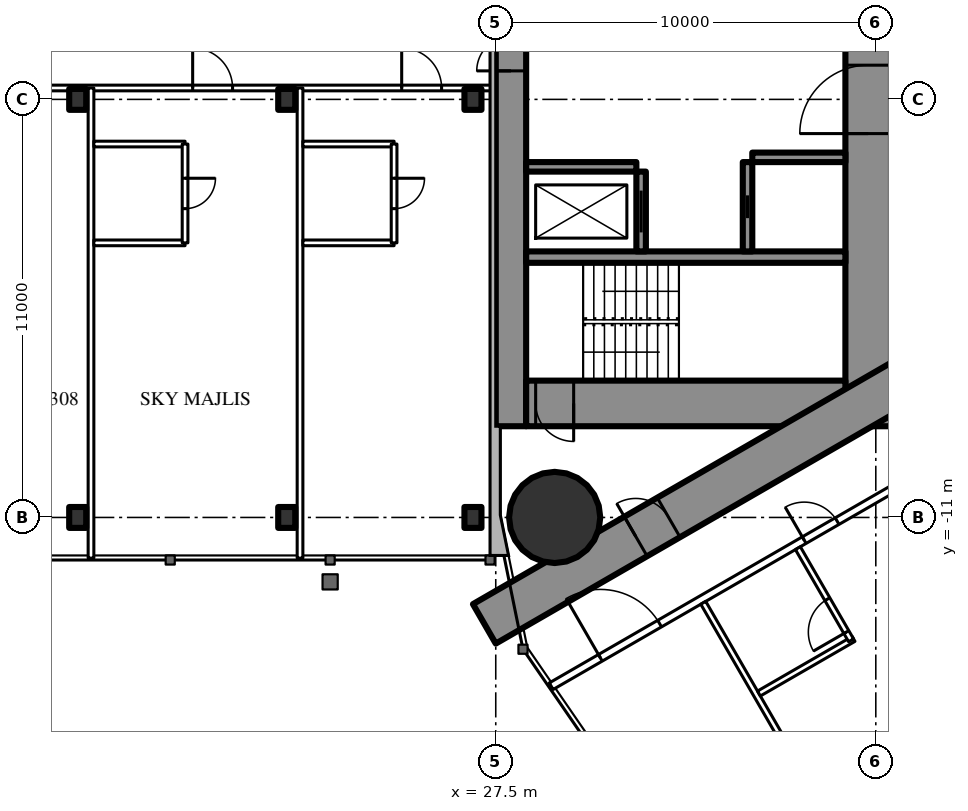
"""IFC4 building model, lengths in metres.
Left out: names, types, materials, properties, quantities, classifications, styles, units other than length and angle.
Written with IfcOpenShell. Run it as: python <this file> out.ifc"""

import sys

from ifc_helpers import new_model, si_unit, direction, frame, frame_2d, origin, origin_2d, place, context, subcontext, project, spatial, rectangle, circle, i_section, extrude, element, fill, save


model = new_model("IFC4")
c1 = context("Model", 3, precision=1e-05, world=origin(), true_north=direction((0.0, 1.0)))
c2 = subcontext(c1, "Body", "Model", "MODEL_VIEW")
j1 = project(units=[si_unit("LENGTHUNIT", "METRE"), si_unit("PLANEANGLEUNIT", "RADIAN")], contexts=[c1])
p1 = place(None, origin())
s1 = spatial("IfcSite", under=j1, at=p1, CompositionType="ELEMENT")
p2 = place(p1, origin())
s2 = spatial("IfcBuilding", under=s1, at=p2, CompositionType="ELEMENT")
p3 = place(p2, frame((0.0, 0.0, 236.9)))
s3 = spatial("IfcBuildingStorey", under=s2, at=p3, CompositionType="ELEMENT", Elevation=236.9)
p4 = place(p3, frame((29.05, -11.0, 0.0), z_axis=(0.0, 0.0, 1.0), x_axis=(1.0, 0.0, 0.0)))
e1 = element("IfcColumn", 1, at=p4, inside=s3, PredefinedType="COLUMN", context=c2, shape_type="SweptSolid", body=[
    extrude(circle(Radius=1.2, at=origin_2d()), origin(), (0.0, 0.0, 1.0), 3.6),
])
p5 = place(p3, frame((27.9, -8.6, 0.0), z_axis=(0.0, 0.0, 1.0), x_axis=(0.0, 1.0, 0.0)))
e2 = element("IfcWall", 2, at=p5, inside=s3, PredefinedType="SHEAR", context=c2, shape_type="SweptSolid", body=[
    extrude(rectangle(XDim=17.2, YDim=0.8, at=frame_2d((8.6, 0.0))), origin(), (0.0, 0.0, 1.0), 3.6),
])
p6 = place(p5, frame((9.35, 0.0, 0.0)))
e3 = element("IfcOpeningElement", 3, at=p6, cuts=e2, PredefinedType="OPENING", context=c2, shape_type="SweptSolid", body=[
    extrude(rectangle(XDim=0.9, YDim=2.2, at=frame_2d((0.45, 1.1))), frame((0.0, 0.41, 0.0), z_axis=(0.0, -1.0, 0.0), x_axis=(1.0, 0.0, 0.0)), (0.0, 0.0, 1.0), 0.82),
])
p7 = place(p3, frame((37.3, -8.6, 0.0), z_axis=(0.0, 0.0, 1.0), x_axis=(0.0, 1.0, 0.0)))
e4 = element("IfcWall", 4, at=p7, inside=s3, PredefinedType="SHEAR", context=c2, shape_type="SweptSolid", body=[
    extrude(rectangle(XDim=17.2, YDim=1.2, at=frame_2d((8.6, 0.0))), origin(), (0.0, 0.0, 1.0), 3.6),
])
p8 = place(p7, frame((7.7, 0.0, 0.0)))
e5 = element("IfcOpeningElement", 5, at=p8, cuts=e4, PredefinedType="OPENING", context=c2, shape_type="SweptSolid", body=[
    extrude(rectangle(XDim=1.8, YDim=2.2, at=frame_2d((0.9, 1.1))), frame((0.0, 0.61, 0.0), z_axis=(0.0, -1.0, 0.0), x_axis=(1.0, 0.0, 0.0)), (0.0, 0.0, 1.0), 1.22),
])
p9 = place(p3, frame((28.3, -8.0, 0.0), z_axis=(0.0, 0.0, 1.0), x_axis=(1.0, 0.0, 0.0)))
e6 = element("IfcWall", 6, at=p9, inside=s3, PredefinedType="SHEAR", context=c2, shape_type="SweptSolid", body=[
    extrude(rectangle(XDim=8.4, YDim=1.2, at=frame_2d((4.2, 0.0))), origin(), (0.0, 0.0, 1.0), 3.6),
])
p10 = place(p9, frame((0.25, 0.0, 0.0)))
e7 = element("IfcOpeningElement", 7, at=p10, cuts=e6, PredefinedType="OPENING", context=c2, shape_type="SweptSolid", body=[
    extrude(rectangle(XDim=1.0, YDim=2.2, at=frame_2d((0.5, 1.1))), frame((0.0, 0.61, 0.0), z_axis=(0.0, -1.0, 0.0), x_axis=(1.0, 0.0, 0.0)), (0.0, 0.0, 1.0), 1.22),
])
p11 = place(p3, frame((28.3, -4.15, 0.0), z_axis=(0.0, 0.0, 1.0), x_axis=(1.0, 0.0, 0.0)))
e8 = element("IfcWall", 8, at=p11, inside=s3, PredefinedType="SHEAR", context=c2, shape_type="SweptSolid", body=[
    extrude(rectangle(XDim=8.4, YDim=0.3, at=frame_2d((4.2, 0.0))), origin(), (0.0, 0.0, 1.0), 3.6),
])
p12 = place(p3, frame((31.325, -4.0, 0.0), z_axis=(0.0, 0.0, 1.0), x_axis=(0.0, 1.0, 0.0)))
e9 = element("IfcWall", 9, at=p12, inside=s3, PredefinedType="SHEAR", context=c2, shape_type="SweptSolid", body=[
    extrude(rectangle(XDim=2.1, YDim=0.25, at=frame_2d((1.05, 0.0))), origin(), (0.0, 0.0, 1.0), 3.6),
])
p13 = place(p12, frame((0.5, 0.0, 0.0)))
e10 = element("IfcOpeningElement", 10, at=p13, cuts=e9, PredefinedType="OPENING", context=c2, shape_type="SweptSolid", body=[
    extrude(rectangle(XDim=1.1, YDim=2.2, at=frame_2d((0.55, 1.1))), frame((0.0, 0.135, 0.0), z_axis=(0.0, -1.0, 0.0), x_axis=(1.0, 0.0, 0.0)), (0.0, 0.0, 1.0), 0.27),
])
p14 = place(p3, frame((34.125, -4.0, 0.0), z_axis=(0.0, 0.0, 1.0), x_axis=(0.0, 1.0, 0.0)))
e11 = element("IfcWall", 11, at=p14, inside=s3, PredefinedType="SHEAR", context=c2, shape_type="SweptSolid", body=[
    extrude(rectangle(XDim=2.35, YDim=0.25, at=frame_2d((1.175, 0.0))), origin(), (0.0, 0.0, 1.0), 3.6),
])
p15 = place(p14, frame((0.875, 0.0, 0.0)))
e12 = element("IfcOpeningElement", 12, at=p15, cuts=e11, PredefinedType="OPENING", context=c2, shape_type="SweptSolid", body=[
    extrude(rectangle(XDim=0.6, YDim=2.0, at=frame_2d((0.3, 1.0))), frame((0.0, 0.135, 0.0), z_axis=(0.0, -1.0, 0.0), x_axis=(1.0, 0.0, 0.0)), (0.0, 0.0, 1.0), 0.27),
])
p16 = place(p3, frame((28.3, -1.775, 0.0), z_axis=(0.0, 0.0, 1.0), x_axis=(1.0, 0.0, 0.0)))
e13 = element("IfcWall", 13, at=p16, inside=s3, PredefinedType="SHEAR", context=c2, shape_type="SweptSolid", body=[
    extrude(rectangle(XDim=2.9, YDim=0.25, at=frame_2d((1.45, 0.0))), origin(), (0.0, 0.0, 1.0), 3.6),
])
p17 = place(p3, frame((34.25, -1.525, 0.0), z_axis=(0.0, 0.0, 1.0), x_axis=(1.0, 0.0, 0.0)))
e14 = element("IfcWall", 14, at=p17, inside=s3, PredefinedType="SHEAR", context=c2, shape_type="SweptSolid", body=[
    extrude(rectangle(XDim=2.45, YDim=0.25, at=frame_2d((1.225, 0.0))), origin(), (0.0, 0.0, 1.0), 3.6),
])
p18 = place(p3, frame((27.2, -13.8, 0.0), z_axis=(0.0, 0.0, 1.0), x_axis=(0.866027159892, 0.499996958321, 0.0)))
e15 = element("IfcWall", 15, at=p18, inside=s3, PredefinedType="SHEAR", context=c2, shape_type="SweptSolid", body=[
    extrude(rectangle(XDim=27.947, YDim=1.2, at=frame_2d((13.973, 0.0))), origin(), (0.0, 0.0, 1.0), 3.6),
])
p19 = place(p18, frame((4.6, 0.0, 0.0)))
e16 = element("IfcOpeningElement", 16, at=p19, cuts=e15, PredefinedType="OPENING", context=c2, shape_type="SweptSolid", body=[
    extrude(rectangle(XDim=1.0, YDim=2.2, at=frame_2d((0.5, 1.1))), frame((0.0, 0.61, 0.0), z_axis=(0.0, -1.0, 0.0), x_axis=(1.0, 0.0, 0.0)), (0.0, 0.0, 1.0), 1.22),
])
p20 = place(p18, frame((13.395, 0.0, 0.0)))
e17 = element("IfcOpeningElement", 17, at=p20, cuts=e15, PredefinedType="OPENING", context=c2, shape_type="SweptSolid", body=[
    extrude(rectangle(XDim=1.8, YDim=2.2, at=frame_2d((0.9, 1.1))), frame((0.0, 0.61, 0.0), z_axis=(0.0, -1.0, 0.0), x_axis=(1.0, 0.0, 0.0)), (0.0, 0.0, 1.0), 1.22),
])
p21 = place(p3, frame((27.2, 13.8, 0.0), z_axis=(0.0, 0.0, 1.0), x_axis=(0.866024515034, -0.500001539357, 0.0)))
e18 = element("IfcWall", 18, at=p21, inside=s3, PredefinedType="SHEAR", context=c2, shape_type="SweptSolid", body=[
    extrude(rectangle(XDim=26.907, YDim=1.2, at=frame_2d((13.454, 0.0))), origin(), (0.0, 0.0, 1.0), 3.6),
])
p22 = place(p21, frame((4.6, 0.0, 0.0)))
e19 = element("IfcOpeningElement", 19, at=p22, cuts=e18, PredefinedType="OPENING", context=c2, shape_type="SweptSolid", body=[
    extrude(rectangle(XDim=1.0, YDim=2.2, at=frame_2d((0.5, 1.1))), frame((0.0, 0.61, 0.0), z_axis=(0.0, -1.0, 0.0), x_axis=(1.0, 0.0, 0.0)), (0.0, 0.0, 1.0), 1.22),
])
p23 = place(p21, frame((13.395, 0.0, 0.0)))
e20 = element("IfcOpeningElement", 20, at=p23, cuts=e18, PredefinedType="OPENING", context=c2, shape_type="SweptSolid", body=[
    extrude(rectangle(XDim=1.8, YDim=2.2, at=frame_2d((0.9, 1.1))), frame((0.0, 0.61, 0.0), z_axis=(0.0, -1.0, 0.0), x_axis=(1.0, 0.0, 0.0)), (0.0, 0.0, 1.0), 1.22),
])
for number, where, z_axis, x_axis in (
    (21, (16.5, -11.0, 0.0), (0.0, 0.0, 1.0), (1.0, 0.0, 0.0)),
    (22, (22.0, -11.0, 0.0), (0.0, 0.0, 1.0), (1.0, 0.0, 0.0)),
    (23, (26.9, -11.0, 0.0), (0.0, 0.0, 1.0), (1.0, 0.0, 0.0)),
    (24, (16.5, 0.0, 0.0), (0.0, 0.0, 1.0), (1.0, 0.0, 0.0)),
    (25, (22.0, 0.0, 0.0), (0.0, 0.0, 1.0), (1.0, 0.0, 0.0)),
    (26, (26.9, 0.0, 0.0), (0.0, 0.0, 1.0), (1.0, 0.0, 0.0)),
):
    element("IfcColumn", number, at=place(p3, frame(where, z_axis=z_axis, x_axis=x_axis)), inside=s3, PredefinedType="COLUMN", context=c2, shape_type="SweptSolid", body=[
        extrude(i_section(OverallWidth=0.448, OverallDepth=0.55, WebThickness=0.072, FlangeThickness=0.115, FilletRadius=0.02, at=origin_2d()), origin(), (0.0, 0.0, 1.0), 3.6),
    ])
p24 = place(p3, frame((28.959, -15.44, 0.0), z_axis=(0.0, 0.0, 1.0), x_axis=(0.866025227435, 0.500000305447, 0.0)))
e27 = element("IfcWall", 27, at=p24, inside=s3, PredefinedType="PARTITIONING", context=c2, shape_type="SweptSolid", body=[
    extrude(rectangle(XDim=30.88, YDim=0.2, at=frame_2d((15.44, 0.0))), origin(), (0.0, 0.0, 1.0), 3.35),
])
p25 = place(p24, frame((1.494, 0.0, 0.0)))
e28 = element("IfcOpeningElement", 28, at=p25, cuts=e27, PredefinedType="OPENING", context=c2, shape_type="SweptSolid", body=[
    extrude(rectangle(XDim=1.8, YDim=2.03, at=frame_2d((0.9, 1.015))), frame((0.0, 0.11, 0.0), z_axis=(0.0, -1.0, 0.0), x_axis=(1.0, 0.0, 0.0)), (0.0, 0.0, 1.0), 0.22),
])
p26 = place(p24, frame((7.687, 0.0, 0.0)))
e29 = element("IfcOpeningElement", 29, at=p26, cuts=e27, PredefinedType="OPENING", context=c2, shape_type="SweptSolid", body=[
    extrude(rectangle(XDim=1.0, YDim=2.2, at=frame_2d((0.5, 1.1))), frame((0.0, 0.11, 0.0), z_axis=(0.0, -1.0, 0.0), x_axis=(1.0, 0.0, 0.0)), (0.0, 0.0, 1.0), 0.22),
])
p27 = place(p24, frame((16.137, 0.0, 0.0)))
e30 = element("IfcOpeningElement", 30, at=p27, cuts=e27, PredefinedType="OPENING", context=c2, shape_type="SweptSolid", body=[
    extrude(rectangle(XDim=0.95, YDim=2.2, at=frame_2d((0.475, 1.1))), frame((0.0, 0.11, 0.0), z_axis=(0.0, -1.0, 0.0), x_axis=(1.0, 0.0, 0.0)), (0.0, 0.0, 1.0), 0.22),
])
p28 = place(p24, frame((20.021, 0.0, 0.0)))
e31 = element("IfcOpeningElement", 31, at=p28, cuts=e27, PredefinedType="OPENING", context=c2, shape_type="SweptSolid", body=[
    extrude(rectangle(XDim=0.95, YDim=2.2, at=frame_2d((0.475, 1.1))), frame((0.0, 0.11, 0.0), z_axis=(0.0, -1.0, 0.0), x_axis=(1.0, 0.0, 0.0)), (0.0, 0.0, 1.0), 0.22),
])
p29 = place(p24, frame((26.253, 0.0, 0.0)))
e32 = element("IfcOpeningElement", 32, at=p29, cuts=e27, PredefinedType="OPENING", context=c2, shape_type="SweptSolid", body=[
    extrude(rectangle(XDim=0.95, YDim=2.2, at=frame_2d((0.475, 1.1))), frame((0.0, 0.11, 0.0), z_axis=(0.0, -1.0, 0.0), x_axis=(1.0, 0.0, 0.0)), (0.0, 0.0, 1.0), 0.22),
])
p30 = place(p3, frame((32.96, -13.246, 0.0), z_axis=(0.0, 0.0, 1.0), x_axis=(0.500000236886, -0.866025267018, 0.0)))
e33 = element("IfcWall", 33, at=p30, inside=s3, PredefinedType="PARTITIONING", context=c2, shape_type="SweptSolid", body=[
    extrude(rectangle(XDim=7.583, YDim=0.15, at=frame_2d((3.791, 0.0))), origin(), (0.0, 0.0, 1.0), 3.35),
])
p31 = place(p3, frame((34.425, -15.633, 0.0), z_axis=(0.0, 0.0, 1.0), x_axis=(0.866018712932, 0.500011588718, 0.0)))
e34 = element("IfcWall", 34, at=p31, inside=s3, PredefinedType="PARTITIONING", context=c2, shape_type="SweptSolid", body=[
    extrude(rectangle(XDim=2.875, YDim=0.15, at=frame_2d((1.438, 0.0))), origin(), (0.0, 0.0, 1.0), 3.35),
])
p32 = place(p3, frame((35.45, -11.808, 0.0), z_axis=(0.0, 0.0, 1.0), x_axis=(0.49994636267, -0.866056369097, 0.0)))
e35 = element("IfcWall", 35, at=p32, inside=s3, PredefinedType="PARTITIONING", context=c2, shape_type="SweptSolid", body=[
    extrude(rectangle(XDim=2.8, YDim=0.15, at=frame_2d((1.4, 0.0))), origin(), (0.0, 0.0, 1.0), 3.35),
])
p33 = place(p32, frame((1.55, 0.0, 0.0)))
e36 = element("IfcOpeningElement", 36, at=p33, cuts=e35, PredefinedType="OPENING", context=c2, shape_type="SweptSolid", body=[
    extrude(rectangle(XDim=1.0, YDim=2.2, at=frame_2d((0.5, 1.1))), frame((0.0, 0.085, 0.0), z_axis=(0.0, -1.0, 0.0), x_axis=(1.0, 0.0, 0.0)), (0.0, 0.0, 1.0), 0.17),
])
p34 = place(p3, frame((-27.5, 0.3, 0.0), z_axis=(0.0, 0.0, 1.0), x_axis=(1.0, 0.0, 0.0)))
e37 = element("IfcWall", 37, at=p34, inside=s3, PredefinedType="PARTITIONING", context=c2, shape_type="SweptSolid", body=[
    extrude(rectangle(XDim=55.0, YDim=0.15, at=frame_2d((27.5, 0.0))), origin(), (0.0, 0.0, 1.0), 2.4),
])
p35 = place(p34, frame((1.575, 0.0, 0.0)))
e38 = element("IfcOpeningElement", 38, at=p35, cuts=e37, PredefinedType="OPENING", context=c2, shape_type="SweptSolid", body=[
    extrude(rectangle(XDim=1.0, YDim=2.2, at=frame_2d((0.5, 1.1))), frame((0.0, 0.085, 0.0), z_axis=(0.0, -1.0, 0.0), x_axis=(1.0, 0.0, 0.0)), (0.0, 0.0, 1.0), 0.17),
])
p36 = place(p34, frame((8.525, 0.0, 0.0)))
e39 = element("IfcOpeningElement", 39, at=p36, cuts=e37, PredefinedType="OPENING", context=c2, shape_type="SweptSolid", body=[
    extrude(rectangle(XDim=1.05, YDim=2.4, at=frame_2d((0.525, 1.2))), frame((0.0, 0.085, 0.0), z_axis=(0.0, -1.0, 0.0), x_axis=(1.0, 0.0, 0.0)), (0.0, 0.0, 1.0), 0.17),
])
p37 = place(p34, frame((14.025, 0.0, 0.0)))
e40 = element("IfcOpeningElement", 40, at=p37, cuts=e37, PredefinedType="OPENING", context=c2, shape_type="SweptSolid", body=[
    extrude(rectangle(XDim=1.05, YDim=2.4, at=frame_2d((0.525, 1.2))), frame((0.0, 0.085, 0.0), z_axis=(0.0, -1.0, 0.0), x_axis=(1.0, 0.0, 0.0)), (0.0, 0.0, 1.0), 0.17),
])
p38 = place(p34, frame((25.025, 0.0, 0.0)))
e41 = element("IfcOpeningElement", 41, at=p38, cuts=e37, PredefinedType="OPENING", context=c2, shape_type="SweptSolid", body=[
    extrude(rectangle(XDim=1.05, YDim=2.4, at=frame_2d((0.525, 1.2))), frame((0.0, 0.085, 0.0), z_axis=(0.0, -1.0, 0.0), x_axis=(1.0, 0.0, 0.0)), (0.0, 0.0, 1.0), 0.17),
])
p39 = place(p34, frame((30.525, 0.0, 0.0)))
e42 = element("IfcOpeningElement", 42, at=p39, cuts=e37, PredefinedType="OPENING", context=c2, shape_type="SweptSolid", body=[
    extrude(rectangle(XDim=1.05, YDim=2.4, at=frame_2d((0.525, 1.2))), frame((0.0, 0.085, 0.0), z_axis=(0.0, -1.0, 0.0), x_axis=(1.0, 0.0, 0.0)), (0.0, 0.0, 1.0), 0.17),
])
p40 = place(p34, frame((41.525, 0.0, 0.0)))
e43 = element("IfcOpeningElement", 43, at=p40, cuts=e37, PredefinedType="OPENING", context=c2, shape_type="SweptSolid", body=[
    extrude(rectangle(XDim=1.05, YDim=2.4, at=frame_2d((0.525, 1.2))), frame((0.0, 0.085, 0.0), z_axis=(0.0, -1.0, 0.0), x_axis=(1.0, 0.0, 0.0)), (0.0, 0.0, 1.0), 0.17),
])
p41 = place(p34, frame((47.025, 0.0, 0.0)))
e44 = element("IfcOpeningElement", 44, at=p41, cuts=e37, PredefinedType="OPENING", context=c2, shape_type="SweptSolid", body=[
    extrude(rectangle(XDim=1.05, YDim=2.4, at=frame_2d((0.525, 1.2))), frame((0.0, 0.085, 0.0), z_axis=(0.0, -1.0, 0.0), x_axis=(1.0, 0.0, 0.0)), (0.0, 0.0, 1.0), 0.17),
])
p42 = place(p34, frame((52.525, 0.0, 0.0)))
e45 = element("IfcOpeningElement", 45, at=p42, cuts=e37, PredefinedType="OPENING", context=c2, shape_type="SweptSolid", body=[
    extrude(rectangle(XDim=1.05, YDim=2.4, at=frame_2d((0.525, 1.2))), frame((0.0, 0.085, 0.0), z_axis=(0.0, -1.0, 0.0), x_axis=(1.0, 0.0, 0.0)), (0.0, 0.0, 1.0), 0.17),
])
for number, where, z_axis, x_axis in (
    (46, (16.85, -12.07, 0.0), (0.0, 0.0, 1.0), (0.0, 1.0, 0.0)),
    (47, (22.35, -12.07, 0.0), (0.0, 0.0, 1.0), (0.0, 1.0, 0.0)),
):
    element("IfcWall", number, at=place(p3, frame(where, z_axis=z_axis, x_axis=x_axis)), inside=s3, PredefinedType="PARTITIONING", context=c2, shape_type="SweptSolid", body=[
        extrude(rectangle(XDim=12.37, YDim=0.15, at=frame_2d((6.185, 0.0))), origin(), (0.0, 0.0, 1.0), 3.4),
    ])
for number, where, z_axis, x_axis in (
    (48, (16.925, -3.775, 0.0), (0.0, 0.0, 1.0), (1.0, 0.0, 0.0)),
    (49, (16.925, -1.175, 0.0), (0.0, 0.0, 1.0), (1.0, 0.0, 0.0)),
):
    element("IfcWall", number, at=place(p3, frame(where, z_axis=z_axis, x_axis=x_axis)), inside=s3, PredefinedType="PARTITIONING", context=c2, shape_type="SweptSolid", body=[
        extrude(rectangle(XDim=2.4, YDim=0.15, at=frame_2d((1.2, 0.0))), origin(), (0.0, 0.0, 1.0), 3.4),
    ])
p43 = place(p3, frame((19.325, -3.775, 0.0), z_axis=(0.0, 0.0, 1.0), x_axis=(0.0, 1.0, 0.0)))
e50 = element("IfcWall", 50, at=p43, inside=s3, PredefinedType="PARTITIONING", context=c2, shape_type="SweptSolid", body=[
    extrude(rectangle(XDim=2.6, YDim=0.15, at=frame_2d((1.3, 0.0))), origin(), (0.0, 0.0, 1.0), 3.4),
])
p44 = place(p43, frame((0.9, 0.0, 0.0)))
e51 = element("IfcOpeningElement", 51, at=p44, cuts=e50, PredefinedType="OPENING", context=c2, shape_type="SweptSolid", body=[
    extrude(rectangle(XDim=0.8, YDim=2.2, at=frame_2d((0.4, 1.1))), frame((0.0, 0.085, 0.0), z_axis=(0.0, -1.0, 0.0), x_axis=(1.0, 0.0, 0.0)), (0.0, 0.0, 1.0), 0.17),
])
for number, where, z_axis, x_axis in (
    (52, (22.425, -3.775, 0.0), (0.0, 0.0, 1.0), (1.0, 0.0, 0.0)),
    (53, (22.425, -1.175, 0.0), (0.0, 0.0, 1.0), (1.0, 0.0, 0.0)),
):
    element("IfcWall", number, at=place(p3, frame(where, z_axis=z_axis, x_axis=x_axis)), inside=s3, PredefinedType="PARTITIONING", context=c2, shape_type="SweptSolid", body=[
        extrude(rectangle(XDim=2.4, YDim=0.15, at=frame_2d((1.2, 0.0))), origin(), (0.0, 0.0, 1.0), 3.4),
    ])
p45 = place(p3, frame((24.825, -3.775, 0.0), z_axis=(0.0, 0.0, 1.0), x_axis=(0.0, 1.0, 0.0)))
e54 = element("IfcWall", 54, at=p45, inside=s3, PredefinedType="PARTITIONING", context=c2, shape_type="SweptSolid", body=[
    extrude(rectangle(XDim=2.6, YDim=0.15, at=frame_2d((1.3, 0.0))), origin(), (0.0, 0.0, 1.0), 3.4),
])
p46 = place(p45, frame((0.9, 0.0, 0.0)))
e55 = element("IfcOpeningElement", 55, at=p46, cuts=e54, PredefinedType="OPENING", context=c2, shape_type="SweptSolid", body=[
    extrude(rectangle(XDim=0.8, YDim=2.2, at=frame_2d((0.4, 1.1))), frame((0.0, 0.085, 0.0), z_axis=(0.0, -1.0, 0.0), x_axis=(1.0, 0.0, 0.0)), (0.0, 0.0, 1.0), 0.17),
])
p47 = place(p25, origin())
e56 = element("IfcDoor", 56, at=p47, inside=s3, OperationType="DOUBLE_DOOR_SINGLE_SWING", PredefinedType="DOOR", context=c2, shape_type="SweptSolid", body=[
    extrude(rectangle(XDim=1.8, YDim=2.03, at=frame_2d((0.9, 1.015))), frame((0.0, 0.025, 0.0), z_axis=(0.0, -1.0, 0.0), x_axis=(1.0, 0.0, 0.0)), (0.0, 0.0, 1.0), 0.05),
])
fill(e28, e56)
p48 = place(p33, origin())
e57 = element("IfcDoor", 57, at=p48, inside=s3, OperationType="SINGLE_SWING_RIGHT", PredefinedType="DOOR", context=c2, shape_type="SweptSolid", body=[
    extrude(rectangle(XDim=1.0, YDim=2.2, at=frame_2d((0.5, 1.1))), frame((0.0, 0.025, 0.0), z_axis=(0.0, -1.0, 0.0), x_axis=(1.0, 0.0, 0.0)), (0.0, 0.0, 1.0), 0.05),
])
fill(e36, e57)
p49 = place(p26, origin())
e58 = element("IfcDoor", 58, at=p49, inside=s3, OperationType="SINGLE_SWING_LEFT", PredefinedType="DOOR", context=c2, shape_type="SweptSolid", body=[
    extrude(rectangle(XDim=1.0, YDim=2.2, at=frame_2d((0.5, 1.1))), frame((0.0, 0.025, 0.0), z_axis=(0.0, -1.0, 0.0), x_axis=(1.0, 0.0, 0.0)), (0.0, 0.0, 1.0), 0.05),
])
fill(e29, e58)
p50 = place(p19, origin())
e59 = element("IfcDoor", 59, at=p50, inside=s3, OperationType="SINGLE_SWING_LEFT", PredefinedType="DOOR", context=c2, shape_type="SweptSolid", body=[
    extrude(rectangle(XDim=1.0, YDim=2.2, at=frame_2d((0.5, 1.1))), frame((0.0, 0.025, 0.0), z_axis=(0.0, -1.0, 0.0), x_axis=(1.0, 0.0, 0.0)), (0.0, 0.0, 1.0), 0.05),
])
fill(e16, e59)
p51 = place(p8, origin())
e60 = element("IfcDoor", 60, at=p51, inside=s3, OperationType="DOUBLE_DOOR_SINGLE_SWING", PredefinedType="DOOR", context=c2, shape_type="SweptSolid", body=[
    extrude(rectangle(XDim=1.8, YDim=2.2, at=frame_2d((0.9, 1.1))), frame((0.0, 0.025, 0.0), z_axis=(0.0, -1.0, 0.0), x_axis=(1.0, 0.0, 0.0)), (0.0, 0.0, 1.0), 0.05),
])
fill(e5, e60)
p52 = place(p10, origin())
e61 = element("IfcDoor", 61, at=p52, inside=s3, OperationType="SINGLE_SWING_RIGHT", PredefinedType="DOOR", context=c2, shape_type="SweptSolid", body=[
    extrude(rectangle(XDim=1.0, YDim=2.2, at=frame_2d((0.5, 1.1))), frame((0.0, 0.025, 0.0), z_axis=(0.0, -1.0, 0.0), x_axis=(1.0, 0.0, 0.0)), (0.0, 0.0, 1.0), 0.05),
])
fill(e7, e61)
p53 = place(p6, origin())
e62 = element("IfcDoor", 62, at=p53, inside=s3, OperationType="SINGLE_SWING_LEFT", PredefinedType="DOOR", context=c2, shape_type="SweptSolid", body=[
    extrude(rectangle(XDim=0.9, YDim=2.2, at=frame_2d((0.45, 1.1))), frame((0.0, 0.025, 0.0), z_axis=(0.0, -1.0, 0.0), x_axis=(1.0, 0.0, 0.0)), (0.0, 0.0, 1.0), 0.05),
])
fill(e3, e62)
p54 = place(p44, origin())
e63 = element("IfcDoor", 63, at=p54, inside=s3, OperationType="SINGLE_SWING_RIGHT", PredefinedType="DOOR", context=c2, shape_type="SweptSolid", body=[
    extrude(rectangle(XDim=0.8, YDim=2.2, at=frame_2d((0.4, 1.1))), frame((0.0, 0.025, 0.0), z_axis=(0.0, -1.0, 0.0), x_axis=(1.0, 0.0, 0.0)), (0.0, 0.0, 1.0), 0.05),
])
fill(e51, e63)
p55 = place(p41, origin())
e64 = element("IfcDoor", 64, at=p55, inside=s3, OperationType="SINGLE_SWING_LEFT", PredefinedType="DOOR", context=c2, shape_type="SweptSolid", body=[
    extrude(rectangle(XDim=1.05, YDim=2.4, at=frame_2d((0.525, 1.2))), frame((0.0, 0.025, 0.0), z_axis=(0.0, -1.0, 0.0), x_axis=(1.0, 0.0, 0.0)), (0.0, 0.0, 1.0), 0.05),
])
fill(e44, e64)
p56 = place(p46, origin())
e65 = element("IfcDoor", 65, at=p56, inside=s3, OperationType="SINGLE_SWING_RIGHT", PredefinedType="DOOR", context=c2, shape_type="SweptSolid", body=[
    extrude(rectangle(XDim=0.8, YDim=2.2, at=frame_2d((0.4, 1.1))), frame((0.0, 0.025, 0.0), z_axis=(0.0, -1.0, 0.0), x_axis=(1.0, 0.0, 0.0)), (0.0, 0.0, 1.0), 0.05),
])
fill(e55, e65)
p57 = place(p42, origin())
e66 = element("IfcDoor", 66, at=p57, inside=s3, OperationType="SINGLE_SWING_LEFT", PredefinedType="DOOR", context=c2, shape_type="SweptSolid", body=[
    extrude(rectangle(XDim=1.05, YDim=2.4, at=frame_2d((0.525, 1.2))), frame((0.0, 0.025, 0.0), z_axis=(0.0, -1.0, 0.0), x_axis=(1.0, 0.0, 0.0)), (0.0, 0.0, 1.0), 0.05),
])
fill(e45, e66)
p58 = place(p13, origin())
e67 = element("IfcDoor", 67, at=p58, inside=s3, OperationType="SLIDING_TO_LEFT", PredefinedType="USERDEFINED", context=c2, shape_type="SweptSolid", body=[
    extrude(rectangle(XDim=1.1, YDim=2.2, at=frame_2d((0.55, 1.1))), frame((0.0, 0.025, 0.0), z_axis=(0.0, -1.0, 0.0), x_axis=(1.0, 0.0, 0.0)), (0.0, 0.0, 1.0), 0.05),
])
fill(e10, e67)
p59 = place(p15, origin())
e68 = element("IfcDoor", 68, at=p59, inside=s3, OperationType="SLIDING_TO_LEFT", PredefinedType="DOOR", context=c2, shape_type="SweptSolid", body=[
    extrude(rectangle(XDim=0.6, YDim=2.0, at=frame_2d((0.3, 1.0))), frame((0.0, 0.025, 0.0), z_axis=(0.0, -1.0, 0.0), x_axis=(1.0, 0.0, 0.0)), (0.0, 0.0, 1.0), 0.05),
])
fill(e12, e68)
save(model, sys.argv[1])
